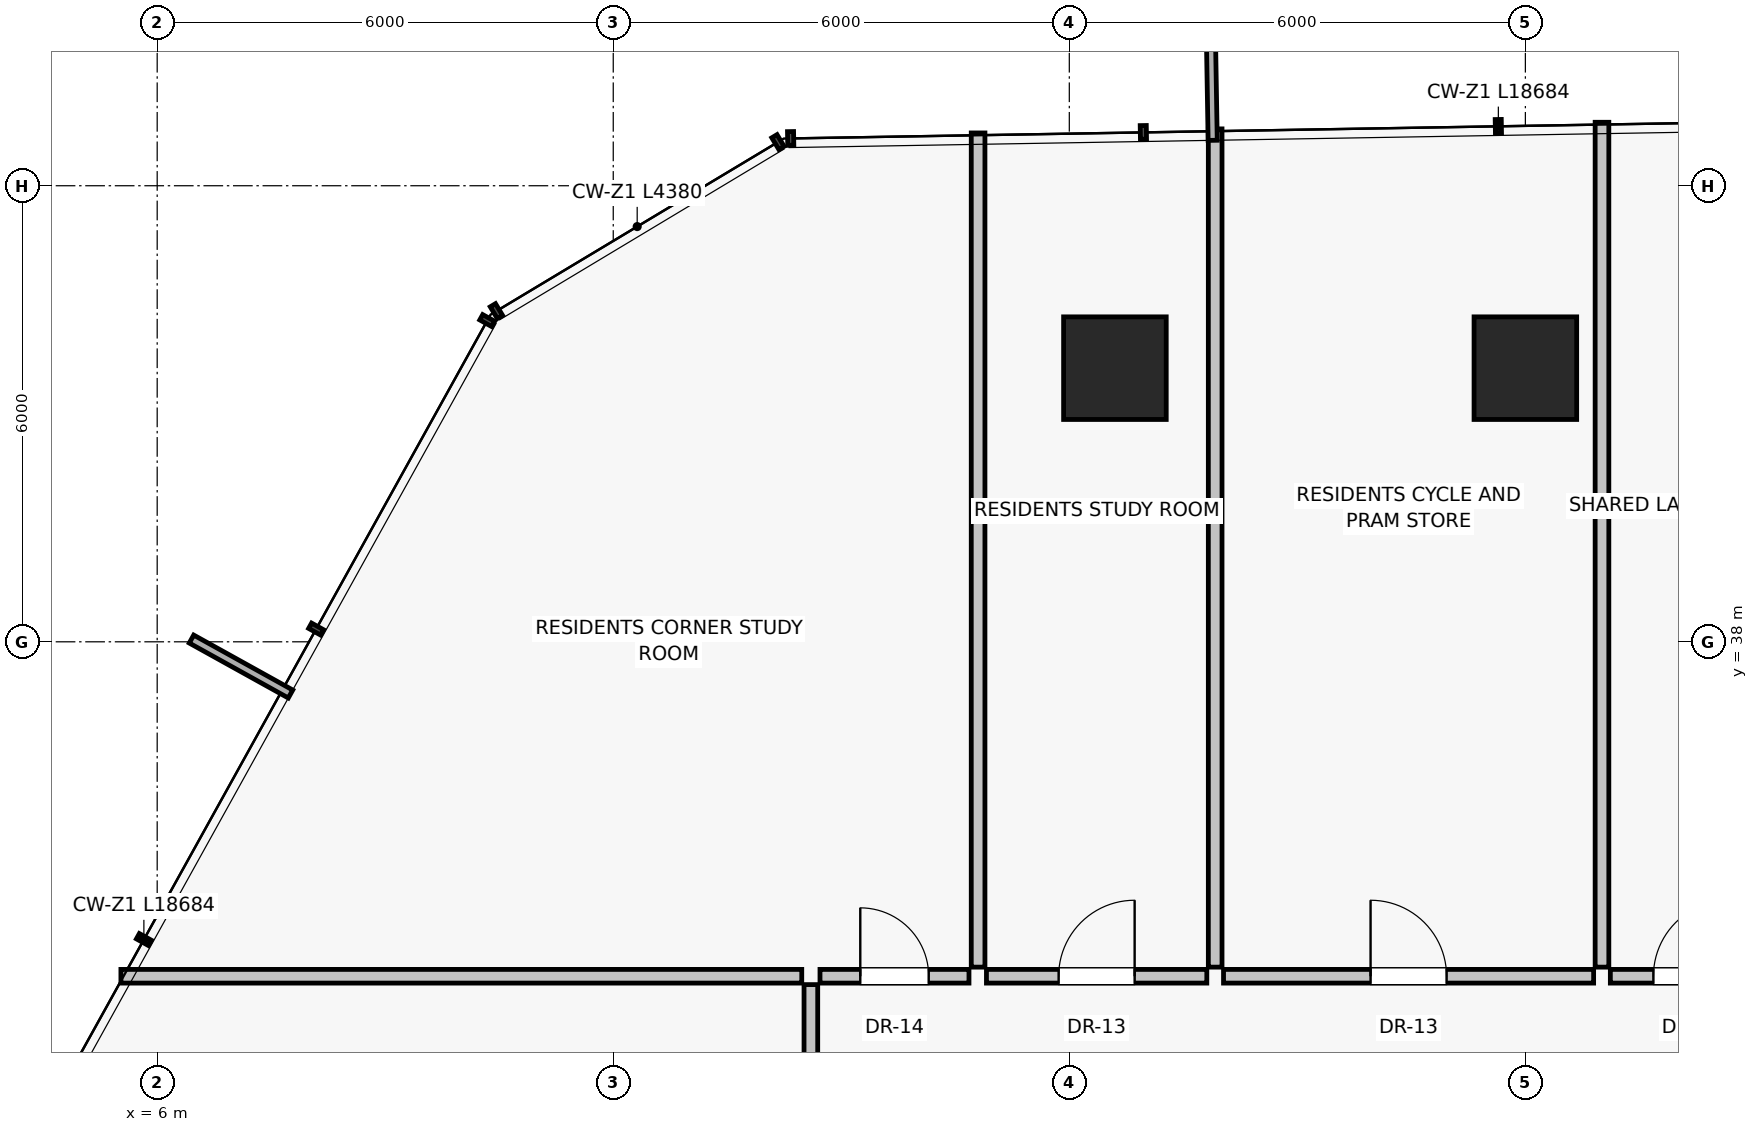
"""IFC4 building model, lengths in metres.
Left out: names, types, materials, properties, quantities, classifications, styles, units other than length and angle.
Written with IfcOpenShell. Run it as: python <this file> out.ifc"""

import sys

from ifc_helpers import new_model, si_unit, direction, frame, frame_2d, origin, origin_2d, place, context, subcontext, project, spatial, rectangle, extrude, source, transform, mapped, element, fill, save


model = new_model("IFC4")
c1 = context("Model", 3, precision=1e-05, world=origin(), true_north=direction((0.0, 1.0)))
c2 = subcontext(c1, "Body", "Model", "MODEL_VIEW")
j1 = project(units=[si_unit("LENGTHUNIT", "METRE"), si_unit("PLANEANGLEUNIT", "RADIAN")], contexts=[c1])
p1 = place(None, origin())
s1 = spatial("IfcSite", under=j1, at=p1, CompositionType="ELEMENT")
p2 = place(p1, origin())
s2 = spatial("IfcBuilding", under=s1, at=p2, CompositionType="ELEMENT")
p3 = place(p2, frame((0.0, 0.0, 27.3)))
s3 = spatial("IfcBuildingStorey", under=s2, at=p3, CompositionType="ELEMENT", Elevation=27.3)
for number, where, z_axis, x_axis in (
    (1, (24.0, 41.6, 0.0), (0.0, 0.0, 1.0), (1.0, 0.0, 0.0)),
    (2, (18.6, 41.6, 0.0), (0.0, 0.0, 1.0), (1.0, 0.0, 0.0)),
):
    element("IfcColumn", number, at=place(p3, frame(where, z_axis=z_axis, x_axis=x_axis)), inside=s3, PredefinedType="COLUMN", context=c2, shape_type="SweptSolid", body=[
        extrude(rectangle(XDim=1.35, YDim=1.35, at=origin_2d()), origin(), (0.0, 0.0, 1.0), 3.25),
    ])
p4 = place(p3, frame((16.8, 33.72, 0.0), z_axis=(0.0, 0.0, 1.0), x_axis=(0.0, 1.0, 0.0)))
e3 = element("IfcWall", 3, at=p4, inside=s3, PredefinedType="PARTITIONING", context=c2, shape_type="SweptSolid", body=[
    extrude(rectangle(XDim=10.975, YDim=0.18, at=frame_2d((5.487, 0.0))), origin(), (0.0, 0.0, 1.0), 3.0),
])
p5 = place(p3, frame((16.91, 33.6, 0.0), z_axis=(0.0, 0.0, 1.0), x_axis=(1.0, 0.0, 0.0)))
e4 = element("IfcWall", 4, at=p5, inside=s3, PredefinedType="PARTITIONING", context=c2, shape_type="SweptSolid", body=[
    extrude(rectangle(XDim=2.899, YDim=0.18, at=frame_2d((1.45, 0.0))), origin(), (0.0, 0.0, 1.0), 3.0),
])
p6 = place(p5, frame((0.949, 0.0, 0.0)))
e5 = element("IfcOpeningElement", 5, at=p6, cuts=e4, PredefinedType="OPENING", context=c2, shape_type="SweptSolid", body=[
    extrude(rectangle(XDim=1.0, YDim=2.01, at=frame_2d((0.5, 1.005))), frame((0.0, 0.1, 0.0), z_axis=(0.0, -1.0, 0.0), x_axis=(1.0, 0.0, 0.0)), (0.0, 0.0, 1.0), 0.2),
])
p7 = place(p3, frame((20.029, 33.6, 0.0), z_axis=(0.0, 0.0, 1.0), x_axis=(1.0, 0.0, 0.0)))
e6 = element("IfcWall", 6, at=p7, inside=s3, PredefinedType="PARTITIONING", context=c2, shape_type="SweptSolid", body=[
    extrude(rectangle(XDim=4.869, YDim=0.18, at=frame_2d((2.435, 0.0))), origin(), (0.0, 0.0, 1.0), 3.0),
])
p8 = place(p7, frame((1.935, 0.0, 0.0)))
e7 = element("IfcOpeningElement", 7, at=p8, cuts=e6, PredefinedType="OPENING", context=c2, shape_type="SweptSolid", body=[
    extrude(rectangle(XDim=1.0, YDim=2.01, at=frame_2d((0.5, 1.005))), frame((0.0, 0.1, 0.0), z_axis=(0.0, -1.0, 0.0), x_axis=(1.0, 0.0, 0.0)), (0.0, 0.0, 1.0), 0.2),
])
p9 = place(p3, frame((19.919, 33.72, 0.0), z_axis=(0.0, 0.0, 1.0), x_axis=(0.0, 1.0, 0.0)))
e8 = element("IfcWall", 8, at=p9, inside=s3, PredefinedType="PARTITIONING", context=c2, shape_type="SweptSolid", body=[
    extrude(rectangle(XDim=11.028, YDim=0.18, at=frame_2d((5.514, 0.0))), origin(), (0.0, 0.0, 1.0), 3.0),
])
p10 = place(p3, frame((25.008, 33.72, 0.0), z_axis=(0.0, 0.0, 1.0), x_axis=(0.0, 1.0, 0.0)))
e9 = element("IfcWall", 9, at=p10, inside=s3, PredefinedType="PARTITIONING", context=c2, shape_type="SweptSolid", body=[
    extrude(rectangle(XDim=11.115, YDim=0.18, at=frame_2d((5.558, 0.0))), origin(), (0.0, 0.0, 1.0), 3.0),
])
p11 = place(p3, frame((25.118, 33.6, 0.0), z_axis=(0.0, 0.0, 1.0), x_axis=(1.0, 0.0, 0.0)))
e10 = element("IfcWall", 10, at=p11, inside=s3, PredefinedType="PARTITIONING", context=c2, shape_type="SweptSolid", body=[
    extrude(rectangle(XDim=2.133, YDim=0.18, at=frame_2d((1.066, 0.0))), origin(), (0.0, 0.0, 1.0), 3.0),
])
p12 = place(p11, frame((0.566, 0.0, 0.0)))
e11 = element("IfcOpeningElement", 11, at=p12, cuts=e10, PredefinedType="OPENING", context=c2, shape_type="SweptSolid", body=[
    extrude(rectangle(XDim=1.0, YDim=2.01, at=frame_2d((0.5, 1.005))), frame((0.0, 0.1, 0.0), z_axis=(0.0, -1.0, 0.0), x_axis=(1.0, 0.0, 0.0)), (0.0, 0.0, 1.0), 0.2),
])
p13 = place(p3, frame((14.48, 33.6, 0.0), z_axis=(0.0, 0.0, 1.0), x_axis=(-1.0, 0.0, 0.0)))
e12 = element("IfcWall", 12, at=p13, inside=s3, PredefinedType="PARTITIONING", context=c2, shape_type="SweptSolid", body=[
    extrude(rectangle(XDim=8.957, YDim=0.18, at=frame_2d((4.479, 0.0))), origin(), (0.0, 0.0, 1.0), 3.0),
])
p14 = place(p3, frame((14.6, 29.139, 0.0), z_axis=(0.0, 0.0, 1.0), x_axis=(0.0, 1.0, 0.0)))
e13 = element("IfcWall", 13, at=p14, inside=s3, PredefinedType="PARTITIONING", context=c2, shape_type="SweptSolid", body=[
    extrude(rectangle(XDim=4.351, YDim=0.18, at=frame_2d((2.176, 0.0))), origin(), (0.0, 0.0, 1.0), 3.0),
])
p15 = place(p14, frame((1.676, 0.0, 0.0)))
e14 = element("IfcOpeningElement", 14, at=p15, cuts=e13, PredefinedType="OPENING", context=c2, shape_type="SweptSolid", body=[
    extrude(rectangle(XDim=1.0, YDim=2.01, at=frame_2d((0.5, 1.005))), frame((0.0, 0.1, 0.0), z_axis=(0.0, -1.0, 0.0), x_axis=(1.0, 0.0, 0.0)), (0.0, 0.0, 1.0), 0.2),
])
p16 = place(p3, frame((14.72, 33.6, 0.0), z_axis=(0.0, 0.0, 1.0), x_axis=(1.0, 0.0, 0.0)))
e15 = element("IfcWall", 15, at=p16, inside=s3, PredefinedType="PARTITIONING", context=c2, shape_type="SweptSolid", body=[
    extrude(rectangle(XDim=1.96, YDim=0.18, at=frame_2d((0.98, 0.0))), origin(), (0.0, 0.0, 1.0), 3.0),
])
p17 = place(p16, frame((0.53, 0.0, 0.0)))
e16 = element("IfcOpeningElement", 16, at=p17, cuts=e15, PredefinedType="OPENING", context=c2, shape_type="SweptSolid", body=[
    extrude(rectangle(XDim=0.9, YDim=2.01, at=frame_2d((0.45, 1.005))), frame((0.0, 0.1, 0.0), z_axis=(0.0, -1.0, 0.0), x_axis=(1.0, 0.0, 0.0)), (0.0, 0.0, 1.0), 0.2),
])
m1 = source(origin(), c2, "Body", "SweptSolid", [
    extrude(rectangle(XDim=1.0, YDim=2.01, at=frame_2d((0.5, 1.005))), frame((0.0, 0.025, 0.0), z_axis=(0.0, -1.0, 0.0), x_axis=(1.0, 0.0, 0.0)), (0.0, 0.0, 1.0), 0.05),
])
p18 = place(p6, origin())
e17 = element("IfcDoor", 17, at=p18, inside=s3, OperationType="SINGLE_SWING_RIGHT", PredefinedType="DOOR", context=c2, shape_type="MappedRepresentation", body=[
    mapped(m1, transform((0.0, 0.0, 0.0), scale=1.0)),
])
fill(e5, e17)
p19 = place(p8, origin())
e18 = element("IfcDoor", 18, at=p19, inside=s3, OperationType="SINGLE_SWING_LEFT", PredefinedType="DOOR", context=c2, shape_type="MappedRepresentation", body=[
    mapped(m1, transform((0.0, 0.0, 0.0), scale=1.0)),
])
fill(e7, e18)
p20 = place(p12, origin())
e19 = element("IfcDoor", 19, at=p20, inside=s3, OperationType="SINGLE_SWING_RIGHT", PredefinedType="DOOR", context=c2, shape_type="MappedRepresentation", body=[
    mapped(m1, transform((0.0, 0.0, 0.0), scale=1.0)),
])
fill(e11, e19)
m2 = source(origin(), c2, "Body", "SweptSolid", [
    extrude(rectangle(XDim=0.9, YDim=2.01, at=frame_2d((0.45, 1.005))), frame((0.0, 0.025, 0.0), z_axis=(0.0, -1.0, 0.0), x_axis=(1.0, 0.0, 0.0)), (0.0, 0.0, 1.0), 0.05),
])
p21 = place(p17, origin())
e20 = element("IfcDoor", 20, at=p21, inside=s3, OperationType="SINGLE_SWING_LEFT", PredefinedType="DOOR", context=c2, shape_type="MappedRepresentation", body=[
    mapped(m2, transform((0.0, 0.0, 0.0), scale=1.0)),
])
fill(e16, e20)
save(model, sys.argv[1])
